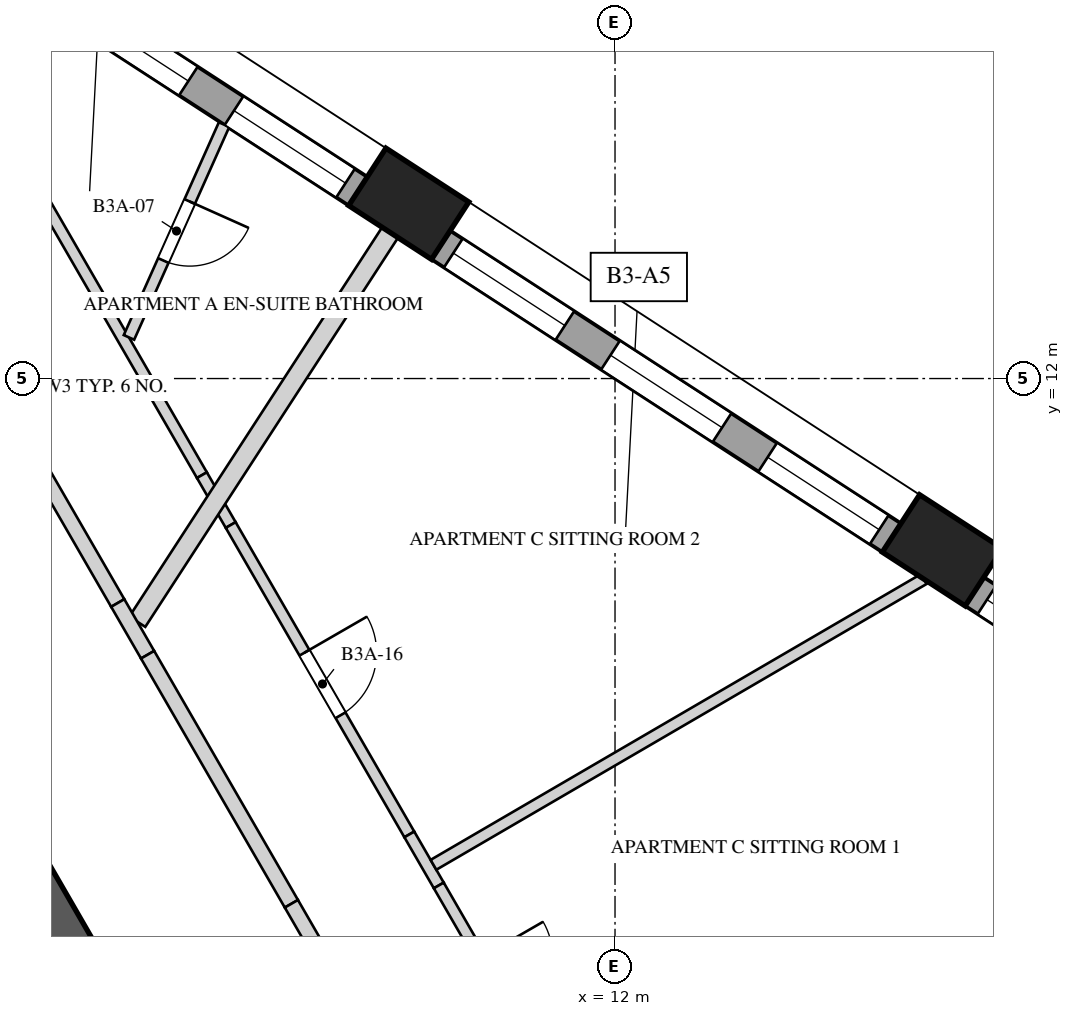
"""IFC4 building model, lengths in metres.
Left out: names, types, materials, properties, quantities, classifications, styles, units other than length and angle.
Written with IfcOpenShell. Run it as: python <this file> out.ifc"""

import sys

from ifc_helpers import new_model, si_unit, direction, frame, frame_2d, origin, origin_2d, place, context, subcontext, project, spatial, rectangle, extrude, element, fill, save


model = new_model("IFC4")
c1 = context("Model", 3, precision=1e-05, world=origin(), true_north=direction((0.0, 1.0)))
c2 = subcontext(c1, "Body", "Model", "MODEL_VIEW")
j1 = project(units=[si_unit("LENGTHUNIT", "METRE"), si_unit("PLANEANGLEUNIT", "RADIAN")], contexts=[c1])
p1 = place(None, origin())
s1 = spatial("IfcSite", under=j1, at=p1, CompositionType="ELEMENT")
p2 = place(p1, origin())
s2 = spatial("IfcBuilding", under=s1, at=p2, CompositionType="ELEMENT")
p3 = place(p2, frame((0.0, 0.0, 129.6)))
s3 = spatial("IfcBuildingStorey", under=s2, at=p3, CompositionType="ELEMENT", Elevation=129.6)
p4 = place(p3, frame((9.729, -4.25, 0.0), z_axis=(0.0, 0.0, 1.0), x_axis=(-0.500004814304, 0.866022624227, 0.0)))
e1 = element("IfcWall", 1, at=p4, inside=s3, PredefinedType="SHEAR", context=c2, shape_type="SweptSolid", body=[
    extrude(rectangle(XDim=17.09, YDim=0.9, at=frame_2d((8.545, 0.0))), origin(), (0.0, 0.0, 1.0), 4.0),
])
p5 = place(p4, frame((6.82, 0.0, 0.0)))
e2 = element("IfcOpeningElement", 2, at=p5, cuts=e1, PredefinedType="OPENING", context=c2, shape_type="SweptSolid", body=[
    extrude(rectangle(XDim=1.0, YDim=2.4, at=frame_2d((0.5, 1.2))), frame((0.0, 0.46, 0.0), z_axis=(0.0, -1.0, 0.0), x_axis=(1.0, 0.0, 0.0)), (0.0, 0.0, 1.0), 0.92),
])
for number, where, z_axis, x_axis in (
    (3, (16.307, 9.74, 0.0), (0.0, 0.0, 1.0), (-0.839, 0.545, 0.0)),
    (4, (9.286, 14.299, 0.0), (0.0, 0.0, 1.0), (-0.839, 0.545, 0.0)),
):
    element("IfcColumn", number, at=place(p3, frame(where, z_axis=z_axis, x_axis=x_axis)), inside=s3, PredefinedType="COLUMN", context=c2, shape_type="SweptSolid", body=[
        extrude(rectangle(XDim=1.3, YDim=0.9, at=origin_2d()), origin(), (0.0, 0.0, 1.0), 4.0),
    ])
p6 = place(p3, frame((18.525, 8.031, 0.0), z_axis=(0.0, 0.0, 1.0), x_axis=(-0.838675466927, 0.544631491171, 0.0)))
e5 = element("IfcWall", 5, at=p6, inside=s3, PredefinedType="SOLIDWALL", context=c2, shape_type="SweptSolid", body=[
    extrude(rectangle(XDim=2.14, YDim=0.45, at=frame_2d((1.07, 0.0))), origin(), (0.0, 0.0, 1.0), 3.3),
])
p7 = place(p6, frame((0.195, 0.0, 0.5)))
e6 = element("IfcOpeningElement", 6, at=p7, cuts=e5, PredefinedType="OPENING", context=c2, shape_type="SweptSolid", body=[
    extrude(rectangle(XDim=1.75, YDim=2.65, at=frame_2d((0.875, 1.325))), frame((0.0, 0.235, 0.0), z_axis=(0.0, -1.0, 0.0), x_axis=(1.0, 0.0, 0.0)), (0.0, 0.0, 1.0), 0.47),
])
p8 = place(p3, frame((15.639, 9.905, 0.0), z_axis=(0.0, 0.0, 1.0), x_axis=(-0.838677021821, 0.54462909679, 0.0)))
e7 = element("IfcWall", 7, at=p8, inside=s3, PredefinedType="SOLIDWALL", context=c2, shape_type="SweptSolid", body=[
    extrude(rectangle(XDim=7.072, YDim=0.45, at=frame_2d((3.536, 0.0))), origin(), (0.0, 0.0, 1.0), 3.3),
])
p9 = place(p8, frame((0.195, 0.0, 0.5)))
e8 = element("IfcOpeningElement", 8, at=p9, cuts=e7, PredefinedType="OPENING", context=c2, shape_type="SweptSolid", body=[
    extrude(rectangle(XDim=1.75, YDim=2.65, at=frame_2d((0.875, 1.325))), frame((0.0, 0.235, 0.0), z_axis=(0.0, -1.0, 0.0), x_axis=(1.0, 0.0, 0.0)), (0.0, 0.0, 1.0), 0.47),
])
p10 = place(p8, frame((2.661, 0.0, 0.5)))
e9 = element("IfcOpeningElement", 9, at=p10, cuts=e7, PredefinedType="OPENING", context=c2, shape_type="SweptSolid", body=[
    extrude(rectangle(XDim=1.75, YDim=2.65, at=frame_2d((0.875, 1.325))), frame((0.0, 0.235, 0.0), z_axis=(0.0, -1.0, 0.0), x_axis=(1.0, 0.0, 0.0)), (0.0, 0.0, 1.0), 0.47),
])
p11 = place(p8, frame((5.126, 0.0, 0.5)))
e10 = element("IfcOpeningElement", 10, at=p11, cuts=e7, PredefinedType="OPENING", context=c2, shape_type="SweptSolid", body=[
    extrude(rectangle(XDim=1.75, YDim=2.65, at=frame_2d((0.875, 1.325))), frame((0.0, 0.235, 0.0), z_axis=(0.0, -1.0, 0.0), x_axis=(1.0, 0.0, 0.0)), (0.0, 0.0, 1.0), 0.47),
])
p12 = place(p3, frame((8.618, 14.465, 0.0), z_axis=(0.0, 0.0, 1.0), x_axis=(-0.838661251934, 0.544653380146, 0.0)))
e11 = element("IfcWall", 11, at=p12, inside=s3, PredefinedType="SOLIDWALL", context=c2, shape_type="SweptSolid", body=[
    extrude(rectangle(XDim=7.072, YDim=0.45, at=frame_2d((3.536, 0.0))), origin(), (0.0, 0.0, 1.0), 3.3),
])
p13 = place(p12, frame((0.195, 0.0, 0.5)))
e12 = element("IfcOpeningElement", 12, at=p13, cuts=e11, PredefinedType="OPENING", context=c2, shape_type="SweptSolid", body=[
    extrude(rectangle(XDim=1.75, YDim=2.65, at=frame_2d((0.875, 1.325))), frame((0.0, 0.235, 0.0), z_axis=(0.0, -1.0, 0.0), x_axis=(1.0, 0.0, 0.0)), (0.0, 0.0, 1.0), 0.47),
])
p14 = place(p12, frame((2.661, 0.0, 0.5)))
e13 = element("IfcOpeningElement", 13, at=p14, cuts=e11, PredefinedType="OPENING", context=c2, shape_type="SweptSolid", body=[
    extrude(rectangle(XDim=1.75, YDim=2.65, at=frame_2d((0.875, 1.325))), frame((0.0, 0.235, 0.0), z_axis=(0.0, -1.0, 0.0), x_axis=(1.0, 0.0, 0.0)), (0.0, 0.0, 1.0), 0.47),
])
p15 = place(p12, frame((5.126, 0.0, 0.5)))
e14 = element("IfcOpeningElement", 14, at=p15, cuts=e11, PredefinedType="OPENING", context=c2, shape_type="SweptSolid", body=[
    extrude(rectangle(XDim=1.75, YDim=2.65, at=frame_2d((0.875, 1.325))), frame((0.0, 0.235, 0.0), z_axis=(0.0, -1.0, 0.0), x_axis=(1.0, 0.0, 0.0)), (0.0, 0.0, 1.0), 0.47),
])
p16 = place(p3, frame((5.092, 2.281, 0.0), z_axis=(0.0, 0.0, 1.0), x_axis=(-0.500018594424, 0.866014668023, 0.0)))
e15 = element("IfcWall", 15, at=p16, inside=s3, PredefinedType="SOLIDWALL", context=c2, shape_type="SweptSolid", body=[
    extrude(rectangle(XDim=4.9, YDim=0.4, at=frame_2d((2.45, 0.0))), origin(), (0.0, 0.0, 1.0), 3.65),
])
p17 = place(p3, frame((3.926, 15.3, 0.0), z_axis=(0.0, 0.0, 1.0), x_axis=(0.499974706519, -0.86604000649, 0.0)))
e16 = element("IfcWall", 16, at=p17, inside=s3, PredefinedType="PARTITIONING", context=c2, shape_type="SweptSolid", body=[
    extrude(rectangle(XDim=5.278, YDim=0.15, at=frame_2d((2.639, 0.0))), origin(), (0.0, 0.0, 1.0), 3.65),
])
p18 = place(p3, frame((6.565, 10.729, 0.0), z_axis=(0.0, 0.0, 1.0), x_axis=(0.500159472144, -0.86593331292, 0.0)))
e17 = element("IfcWall", 17, at=p18, inside=s3, PredefinedType="PARTITIONING", context=c2, shape_type="SweptSolid", body=[
    extrude(rectangle(XDim=0.758, YDim=0.15, at=frame_2d((0.379, 0.0))), origin(), (0.0, 0.0, 1.0), 2.95),
])
p19 = place(p3, frame((6.944, 10.073, 0.0), z_axis=(0.0, 0.0, 1.0), x_axis=(0.499993726502, -0.86602902576, 0.0)))
e18 = element("IfcWall", 18, at=p19, inside=s3, PredefinedType="PARTITIONING", context=c2, shape_type="SweptSolid", body=[
    extrude(rectangle(XDim=4.7, YDim=0.15, at=frame_2d((2.35, 0.0))), origin(), (0.0, 0.0, 1.0), 3.65),
])
p20 = place(p19, frame((1.94, 0.0, 0.0)))
e19 = element("IfcOpeningElement", 19, at=p20, cuts=e18, PredefinedType="OPENING", context=c2, shape_type="SweptSolid", body=[
    extrude(rectangle(XDim=0.95, YDim=2.4, at=frame_2d((0.475, 1.2))), frame((0.0, 0.085, 0.0), z_axis=(0.0, -1.0, 0.0), x_axis=(1.0, 0.0, 0.0)), (0.0, 0.0, 1.0), 0.17),
])
p21 = place(p3, frame((9.294, 6.002, 0.0), z_axis=(0.0, 0.0, 1.0), x_axis=(0.499831512295, -0.866122658356, 0.0)))
e20 = element("IfcWall", 20, at=p21, inside=s3, PredefinedType="PARTITIONING", context=c2, shape_type="SweptSolid", body=[
    extrude(rectangle(XDim=0.775, YDim=0.15, at=frame_2d((0.388, 0.0))), origin(), (0.0, 0.0, 1.0), 2.75),
])
p22 = place(p3, frame((9.681, 5.331, 0.0), z_axis=(0.0, 0.0, 1.0), x_axis=(0.500034735108, -0.866005348532, 0.0)))
e21 = element("IfcWall", 21, at=p22, inside=s3, PredefinedType="PARTITIONING", context=c2, shape_type="SweptSolid", body=[
    extrude(rectangle(XDim=2.797, YDim=0.15, at=frame_2d((1.398, 0.0))), origin(), (0.0, 0.0, 1.0), 3.65),
])
p23 = place(p22, frame((1.1, 0.0, 0.0)))
e22 = element("IfcOpeningElement", 22, at=p23, cuts=e21, PredefinedType="OPENING", context=c2, shape_type="SweptSolid", body=[
    extrude(rectangle(XDim=0.95, YDim=2.4, at=frame_2d((0.475, 1.2))), frame((0.0, 0.085, 0.0), z_axis=(0.0, -1.0, 0.0), x_axis=(1.0, 0.0, 0.0)), (0.0, 0.0, 1.0), 0.17),
])
p24 = place(p3, frame((6.856, 15.341, 0.0), z_axis=(0.0, 0.0, 1.0), x_axis=(-0.408065741822, -0.912952545509, 0.0)))
e23 = element("IfcWall", 23, at=p24, inside=s3, PredefinedType="PARTITIONING", context=c2, shape_type="SweptSolid", body=[
    extrude(rectangle(XDim=3.066, YDim=0.15, at=frame_2d((1.533, 0.0))), origin(), (0.0, 0.0, 1.0), 3.65),
])
p25 = place(p24, frame((1.108, 0.0, 0.0)))
e24 = element("IfcOpeningElement", 24, at=p25, cuts=e23, PredefinedType="OPENING", context=c2, shape_type="SweptSolid", body=[
    extrude(rectangle(XDim=0.85, YDim=2.4, at=frame_2d((0.425, 1.2))), frame((0.0, 0.085, 0.0), z_axis=(0.0, -1.0, 0.0), x_axis=(1.0, 0.0, 0.0)), (0.0, 0.0, 1.0), 0.17),
])
p26 = place(p3, frame((9.041, 13.922, 0.0), z_axis=(0.0, 0.0, 1.0), x_axis=(-0.544639775338, -0.838670087174, 0.0)))
e25 = element("IfcWall", 25, at=p26, inside=s3, PredefinedType="SOLIDWALL", context=c2, shape_type="SweptSolid", body=[
    extrude(rectangle(XDim=6.106, YDim=0.25, at=frame_2d((3.053, 0.0))), origin(), (0.0, 0.0, 1.0), 2.95),
])
p27 = place(p3, frame((9.612, 5.603, 0.0), z_axis=(0.0, 0.0, 1.0), x_axis=(0.863953189991, 0.503572125425, 0.0)))
e26 = element("IfcWall", 26, at=p27, inside=s3, PredefinedType="PARTITIONING", context=c2, shape_type="SweptSolid", body=[
    extrude(rectangle(XDim=7.466, YDim=0.15, at=frame_2d((3.733, 0.0))), origin(), (0.0, 0.0, 1.0), 2.75),
])
p28 = place(p3, frame((11.468, 2.386, 0.0), z_axis=(0.0, 0.0, 1.0), x_axis=(0.979030724859, 0.203712640211, 0.0)))
e27 = element("IfcWall", 27, at=p28, inside=s3, PredefinedType="PARTITIONING", context=c2, shape_type="SweptSolid", body=[
    extrude(rectangle(XDim=11.864, YDim=0.15, at=frame_2d((5.932, 0.0))), origin(), (0.0, 0.0, 1.0), 2.55),
])
p29 = place(p3, frame((2.887, 13.5, 0.0), z_axis=(0.0, 0.0, 1.0), x_axis=(0.50000466804, -0.866022708674, 0.0)))
e28 = element("IfcWall", 28, at=p29, inside=s3, PredefinedType="SOLIDWALL", context=c2, shape_type="SweptSolid", body=[
    extrude(rectangle(XDim=5.142, YDim=0.2, at=frame_2d((2.571, 0.0))), origin(), (0.0, 0.0, 1.0), 3.65),
])
p30 = place(p3, frame((5.458, 9.047, 0.0), z_axis=(0.0, 0.0, 1.0), x_axis=(0.499982474044, -0.866035522163, 0.0)))
e29 = element("IfcWall", 29, at=p30, inside=s3, PredefinedType="SOLIDWALL", context=c2, shape_type="SweptSolid", body=[
    extrude(rectangle(XDim=0.786, YDim=0.2, at=frame_2d((0.393, 0.0))), origin(), (0.0, 0.0, 1.0), 2.95),
])
p31 = place(p3, frame((5.851, 8.366, 0.0), z_axis=(0.0, 0.0, 1.0), x_axis=(0.499998034377, -0.866026538634, 0.0)))
e30 = element("IfcWall", 30, at=p31, inside=s3, PredefinedType="SOLIDWALL", context=c2, shape_type="SweptSolid", body=[
    extrude(rectangle(XDim=3.783, YDim=0.2, at=frame_2d((1.892, 0.0))), origin(), (0.0, 0.0, 1.0), 3.65),
])
p32 = place(p3, frame((7.742, 5.09, 0.0), z_axis=(0.0, 0.0, 1.0), x_axis=(0.500109828528, -0.865961984968, 0.0)))
e31 = element("IfcWall", 31, at=p32, inside=s3, PredefinedType="SOLIDWALL", context=c2, shape_type="SweptSolid", body=[
    extrude(rectangle(XDim=0.8, YDim=0.2, at=frame_2d((0.4, 0.0))), origin(), (0.0, 0.0, 1.0), 2.75),
])
p33 = place(p7, origin())
e32 = element("IfcWindow", 32, at=p33, inside=s3, PartitioningType="SINGLE_PANEL", PredefinedType="WINDOW", context=c2, shape_type="SweptSolid", body=[
    extrude(rectangle(XDim=1.75, YDim=2.65, at=frame_2d((0.875, 1.325))), frame((0.0, 0.03, 0.0), z_axis=(0.0, -1.0, 0.0), x_axis=(1.0, 0.0, 0.0)), (0.0, 0.0, 1.0), 0.06),
])
fill(e6, e32)
p34 = place(p9, origin())
e33 = element("IfcWindow", 33, at=p34, inside=s3, PartitioningType="SINGLE_PANEL", PredefinedType="WINDOW", context=c2, shape_type="SweptSolid", body=[
    extrude(rectangle(XDim=1.75, YDim=2.65, at=frame_2d((0.875, 1.325))), frame((0.0, 0.03, 0.0), z_axis=(0.0, -1.0, 0.0), x_axis=(1.0, 0.0, 0.0)), (0.0, 0.0, 1.0), 0.06),
])
fill(e8, e33)
p35 = place(p10, origin())
e34 = element("IfcWindow", 34, at=p35, inside=s3, PartitioningType="SINGLE_PANEL", PredefinedType="WINDOW", context=c2, shape_type="SweptSolid", body=[
    extrude(rectangle(XDim=1.75, YDim=2.65, at=frame_2d((0.875, 1.325))), frame((0.0, 0.03, 0.0), z_axis=(0.0, -1.0, 0.0), x_axis=(1.0, 0.0, 0.0)), (0.0, 0.0, 1.0), 0.06),
])
fill(e9, e34)
p36 = place(p11, origin())
e35 = element("IfcWindow", 35, at=p36, inside=s3, PartitioningType="SINGLE_PANEL", PredefinedType="WINDOW", context=c2, shape_type="SweptSolid", body=[
    extrude(rectangle(XDim=1.75, YDim=2.65, at=frame_2d((0.875, 1.325))), frame((0.0, 0.03, 0.0), z_axis=(0.0, -1.0, 0.0), x_axis=(1.0, 0.0, 0.0)), (0.0, 0.0, 1.0), 0.06),
])
fill(e10, e35)
p37 = place(p13, origin())
e36 = element("IfcWindow", 36, at=p37, inside=s3, PartitioningType="SINGLE_PANEL", PredefinedType="WINDOW", context=c2, shape_type="SweptSolid", body=[
    extrude(rectangle(XDim=1.75, YDim=2.65, at=frame_2d((0.875, 1.325))), frame((0.0, 0.03, 0.0), z_axis=(0.0, -1.0, 0.0), x_axis=(1.0, 0.0, 0.0)), (0.0, 0.0, 1.0), 0.06),
])
fill(e12, e36)
p38 = place(p14, origin())
e37 = element("IfcWindow", 37, at=p38, inside=s3, PartitioningType="SINGLE_PANEL", PredefinedType="WINDOW", context=c2, shape_type="SweptSolid", body=[
    extrude(rectangle(XDim=1.75, YDim=2.65, at=frame_2d((0.875, 1.325))), frame((0.0, 0.03, 0.0), z_axis=(0.0, -1.0, 0.0), x_axis=(1.0, 0.0, 0.0)), (0.0, 0.0, 1.0), 0.06),
])
fill(e13, e37)
p39 = place(p25, origin())
e38 = element("IfcDoor", 38, at=p39, inside=s3, OperationType="SINGLE_SWING_LEFT", PredefinedType="DOOR", context=c2, shape_type="SweptSolid", body=[
    extrude(rectangle(XDim=0.85, YDim=2.4, at=frame_2d((0.425, 1.2))), frame((0.0, 0.025, 0.0), z_axis=(0.0, -1.0, 0.0), x_axis=(1.0, 0.0, 0.0)), (0.0, 0.0, 1.0), 0.05),
])
fill(e24, e38)
p40 = place(p20, origin())
e39 = element("IfcDoor", 39, at=p40, inside=s3, OperationType="SINGLE_SWING_RIGHT", PredefinedType="DOOR", context=c2, shape_type="SweptSolid", body=[
    extrude(rectangle(XDim=0.95, YDim=2.4, at=frame_2d((0.475, 1.2))), frame((0.0, 0.025, 0.0), z_axis=(0.0, -1.0, 0.0), x_axis=(1.0, 0.0, 0.0)), (0.0, 0.0, 1.0), 0.05),
])
fill(e19, e39)
save(model, sys.argv[1])
